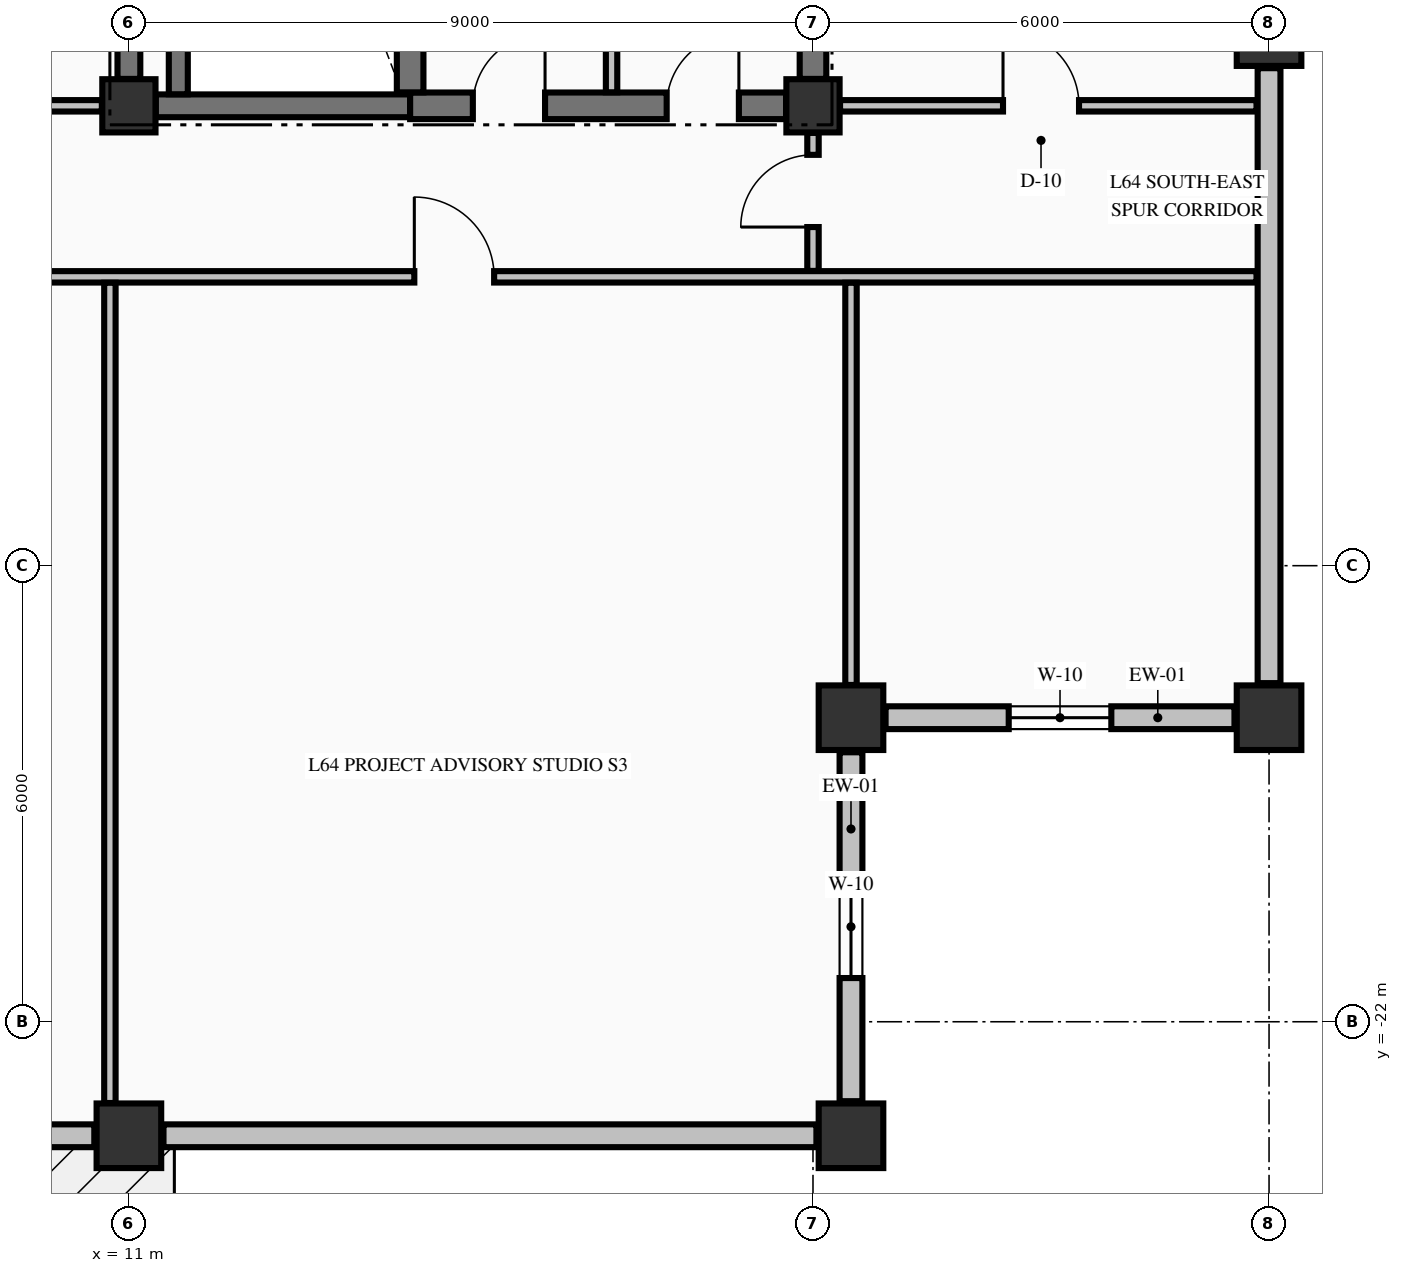
"""IFC4 building model, lengths in metres.
Left out: names, types, materials, properties, quantities, classifications, styles, units other than length and angle.
Written with IfcOpenShell. Run it as: python <this file> out.ifc"""

import sys

from ifc_helpers import new_model, si_unit, direction, frame, frame_2d, origin, origin_2d, place, context, subcontext, project, spatial, rectangle, extrude, element, fill, save


model = new_model("IFC4")
c1 = context("Model", 3, precision=1e-05, world=origin(), true_north=direction((0.0, 1.0)))
c2 = subcontext(c1, "Body", "Model", "MODEL_VIEW")
j1 = project(units=[si_unit("LENGTHUNIT", "METRE"), si_unit("PLANEANGLEUNIT", "RADIAN")], contexts=[c1])
p1 = place(None, origin())
s1 = spatial("IfcSite", under=j1, at=p1, CompositionType="ELEMENT")
p2 = place(p1, origin())
s2 = spatial("IfcBuilding", under=s1, at=p2, CompositionType="ELEMENT")
p3 = place(p2, frame((0.0, 0.0, 242.97)))
s3 = spatial("IfcBuildingStorey", under=s2, at=p3, CompositionType="ELEMENT", Elevation=242.97)
for number, where, z_axis, x_axis in (
    (1, (11.0, -23.5, -0.25), (0.0, 0.0, 1.0), (1.0, 0.0, 0.0)),
    (2, (20.5, -23.5, -0.25), (0.0, 0.0, 1.0), (1.0, 0.0, 0.0)),
    (3, (26.0, -18.0, -0.25), (0.0, 0.0, 1.0), (1.0, 0.0, 0.0)),
    (4, (26.0, -9.0, -0.25), (0.0, 0.0, 1.0), (1.0, 0.0, 0.0)),
    (5, (20.5, -18.0, -0.25), (0.0, 0.0, 1.0), (1.0, 0.0, 0.0)),
):
    element("IfcColumn", number, at=place(p3, frame(where, z_axis=z_axis, x_axis=x_axis)), inside=s3, PredefinedType="COLUMN", context=c2, shape_type="SweptSolid", body=[
        extrude(rectangle(XDim=0.85, YDim=0.85, at=origin_2d()), origin(), (0.0, 0.0, 1.0), 3.23),
    ])
for number, where, z_axis, x_axis in (
    (6, (11.0, -9.95, -0.25), (0.0, 0.0, 1.0), (1.0, 0.0, 0.0)),
    (7, (20.0, -9.95, -0.25), (0.0, 0.0, 1.0), (1.0, 0.0, 0.0)),
):
    element("IfcColumn", number, at=place(p3, frame(where, z_axis=z_axis, x_axis=x_axis)), inside=s3, PredefinedType="COLUMN", context=c2, shape_type="SweptSolid", body=[
        extrude(rectangle(XDim=0.7, YDim=0.7, at=origin_2d()), origin(), (0.0, 0.0, 1.0), 3.23),
    ])
p4 = place(p3, frame((20.5, -23.045, 0.0), z_axis=(0.0, 0.0, 1.0), x_axis=(0.0, 1.0, 0.0)))
e8 = element("IfcWall", 8, at=p4, inside=s3, PredefinedType="STANDARD", context=c2, shape_type="SweptSolid", body=[
    extrude(rectangle(XDim=4.59, YDim=0.3, at=frame_2d((2.295, 0.0))), origin(), (0.0, 0.0, 1.0), 2.372),
])
p5 = place(p4, frame((1.62, 0.0, 0.68)))
e9 = element("IfcOpeningElement", 9, at=p5, cuts=e8, PredefinedType="OPENING", context=c2, shape_type="SweptSolid", body=[
    extrude(rectangle(XDim=1.35, YDim=1.42, at=frame_2d((0.675, 0.71))), frame((0.0, 0.16, 0.0), z_axis=(0.0, -1.0, 0.0), x_axis=(1.0, 0.0, 0.0)), (0.0, 0.0, 1.0), 0.32),
])
p6 = place(p3, frame((20.955, -18.0, 0.0), z_axis=(0.0, 0.0, 1.0), x_axis=(1.0, 0.0, 0.0)))
e10 = element("IfcWall", 10, at=p6, inside=s3, PredefinedType="STANDARD", context=c2, shape_type="SweptSolid", body=[
    extrude(rectangle(XDim=4.59, YDim=0.3, at=frame_2d((2.295, 0.0))), origin(), (0.0, 0.0, 1.0), 2.372),
])
p7 = place(p6, frame((1.62, 0.0, 0.68)))
e11 = element("IfcOpeningElement", 11, at=p7, cuts=e10, PredefinedType="OPENING", context=c2, shape_type="SweptSolid", body=[
    extrude(rectangle(XDim=1.35, YDim=1.42, at=frame_2d((0.675, 0.71))), frame((0.0, 0.16, 0.0), z_axis=(0.0, -1.0, 0.0), x_axis=(1.0, 0.0, 0.0)), (0.0, 0.0, 1.0), 0.32),
])
p8 = place(p3, frame((0.455, -23.5, 0.0), z_axis=(0.0, 0.0, 1.0), x_axis=(1.0, 0.0, 0.0)))
e12 = element("IfcWall", 12, at=p8, inside=s3, PredefinedType="STANDARD", context=c2, shape_type="SweptSolid", body=[
    extrude(rectangle(XDim=10.09, YDim=0.3, at=frame_2d((5.045, 0.0))), origin(), (0.0, 0.0, 1.0), 2.372),
])
p9 = place(p8, frame((1.472, 0.0, 0.7)))
e13 = element("IfcOpeningElement", 13, at=p9, cuts=e12, PredefinedType="OPENING", context=c2, shape_type="SweptSolid", body=[
    extrude(rectangle(XDim=2.1, YDim=1.5, at=frame_2d((1.05, 0.75))), frame((0.0, 0.16, 0.0), z_axis=(0.0, -1.0, 0.0), x_axis=(1.0, 0.0, 0.0)), (0.0, 0.0, 1.0), 0.32),
])
p10 = place(p8, frame((3.995, 0.0, 0.7)))
e14 = element("IfcOpeningElement", 14, at=p10, cuts=e12, PredefinedType="OPENING", context=c2, shape_type="SweptSolid", body=[
    extrude(rectangle(XDim=2.1, YDim=1.5, at=frame_2d((1.05, 0.75))), frame((0.0, 0.16, 0.0), z_axis=(0.0, -1.0, 0.0), x_axis=(1.0, 0.0, 0.0)), (0.0, 0.0, 1.0), 0.32),
])
p11 = place(p8, frame((6.518, 0.0, 0.7)))
e15 = element("IfcOpeningElement", 15, at=p11, cuts=e12, PredefinedType="OPENING", context=c2, shape_type="SweptSolid", body=[
    extrude(rectangle(XDim=2.1, YDim=1.5, at=frame_2d((1.05, 0.75))), frame((0.0, 0.16, 0.0), z_axis=(0.0, -1.0, 0.0), x_axis=(1.0, 0.0, 0.0)), (0.0, 0.0, 1.0), 0.32),
])
p12 = place(p3, frame((11.455, -23.5, 0.0), z_axis=(0.0, 0.0, 1.0), x_axis=(1.0, 0.0, 0.0)))
e16 = element("IfcWall", 16, at=p12, inside=s3, PredefinedType="STANDARD", context=c2, shape_type="SweptSolid", body=[
    extrude(rectangle(XDim=8.59, YDim=0.3, at=frame_2d((4.295, 0.0))), origin(), (0.0, 0.0, 1.0), 2.372),
])
p13 = place(p3, frame((26.0, -17.545, 0.0), z_axis=(0.0, 0.0, 1.0), x_axis=(0.0, 1.0, 0.0)))
e17 = element("IfcWall", 17, at=p13, inside=s3, PredefinedType="STANDARD", context=c2, shape_type="SweptSolid", body=[
    extrude(rectangle(XDim=8.09, YDim=0.3, at=frame_2d((4.045, 0.0))), origin(), (0.0, 0.0, 1.0), 2.372),
])
p14 = place(p3, frame((11.354, -9.95, 0.0), z_axis=(0.0, 0.0, 1.0), x_axis=(1.0, 0.0, 0.0)))
e18 = element("IfcWall", 18, at=p14, inside=s3, PredefinedType="SHEAR", context=c2, shape_type="SweptSolid", body=[
    extrude(rectangle(XDim=3.346, YDim=0.3, at=frame_2d((1.673, 0.0))), origin(), (0.0, 0.0, 1.0), 2.98),
])
p15 = place(p3, frame((14.7, -9.95, 0.0), z_axis=(0.0, 0.0, 1.0), x_axis=(1.0, 0.0, 0.0)))
e19 = element("IfcWall", 19, at=p15, inside=s3, PredefinedType="SHEAR", context=c2, shape_type="SweptSolid", body=[
    extrude(rectangle(XDim=4.946, YDim=0.35, at=frame_2d((2.473, 0.0))), origin(), (0.0, 0.0, 1.0), 2.98),
])
p16 = place(p15, frame((0.825, 0.0, 0.0)))
e20 = element("IfcOpeningElement", 20, at=p16, cuts=e19, PredefinedType="OPENING", context=c2, shape_type="SweptSolid", body=[
    extrude(rectangle(XDim=0.95, YDim=2.15, at=frame_2d((0.475, 1.075))), frame((0.0, 0.185, 0.0), z_axis=(0.0, -1.0, 0.0), x_axis=(1.0, 0.0, 0.0)), (0.0, 0.0, 1.0), 0.37),
])
p17 = place(p15, frame((3.375, 0.0, 0.0)))
e21 = element("IfcOpeningElement", 21, at=p17, cuts=e19, PredefinedType="OPENING", context=c2, shape_type="SweptSolid", body=[
    extrude(rectangle(XDim=0.95, YDim=2.15, at=frame_2d((0.475, 1.075))), frame((0.0, 0.185, 0.0), z_axis=(0.0, -1.0, 0.0), x_axis=(1.0, 0.0, 0.0)), (0.0, 0.0, 1.0), 0.37),
])
p18 = place(p3, frame((-20.075, -12.2, 0.0), z_axis=(0.0, 0.0, 1.0), x_axis=(1.0, 0.0, 0.0)))
e22 = element("IfcWall", 22, at=p18, inside=s3, PredefinedType="PARTITIONING", context=c2, shape_type="SweptSolid", body=[
    extrude(rectangle(XDim=45.91, YDim=0.15, at=frame_2d((22.955, 0.0))), origin(), (0.0, 0.0, 1.0), 2.98),
])
p19 = place(p18, frame((11.88, 0.0, 0.0)))
e23 = element("IfcOpeningElement", 23, at=p19, cuts=e22, PredefinedType="OPENING", context=c2, shape_type="SweptSolid", body=[
    extrude(rectangle(XDim=1.05, YDim=2.15, at=frame_2d((0.525, 1.075))), frame((0.0, 0.085, 0.0), z_axis=(0.0, -1.0, 0.0), x_axis=(1.0, 0.0, 0.0)), (0.0, 0.0, 1.0), 0.17),
])
p20 = place(p18, frame((25.0, 0.0, 0.0)))
e24 = element("IfcOpeningElement", 24, at=p20, cuts=e22, PredefinedType="OPENING", context=c2, shape_type="SweptSolid", body=[
    extrude(rectangle(XDim=1.05, YDim=2.15, at=frame_2d((0.525, 1.075))), frame((0.0, 0.085, 0.0), z_axis=(0.0, -1.0, 0.0), x_axis=(1.0, 0.0, 0.0)), (0.0, 0.0, 1.0), 0.17),
])
p21 = place(p18, frame((34.83, 0.0, 0.0)))
e25 = element("IfcOpeningElement", 25, at=p21, cuts=e22, PredefinedType="OPENING", context=c2, shape_type="SweptSolid", body=[
    extrude(rectangle(XDim=1.05, YDim=2.15, at=frame_2d((0.525, 1.075))), frame((0.0, 0.085, 0.0), z_axis=(0.0, -1.0, 0.0), x_axis=(1.0, 0.0, 0.0)), (0.0, 0.0, 1.0), 0.17),
])
p22 = place(p3, frame((-10.644, -9.95, 0.0), z_axis=(0.0, 0.0, 1.0), x_axis=(1.0, 0.0, 0.0)))
e26 = element("IfcWall", 26, at=p22, inside=s3, PredefinedType="PARTITIONING", context=c2, shape_type="SweptSolid", body=[
    extrude(rectangle(XDim=21.288, YDim=0.15, at=frame_2d((10.644, 0.0))), origin(), (0.0, 0.0, 1.0), 2.98),
])
p23 = place(p22, frame((13.544, 0.0, 0.0)))
e27 = element("IfcOpeningElement", 27, at=p23, cuts=e26, PredefinedType="OPENING", context=c2, shape_type="SweptSolid", body=[
    extrude(rectangle(XDim=1.1, YDim=2.15, at=frame_2d((0.55, 1.075))), frame((0.0, 0.085, 0.0), z_axis=(0.0, -1.0, 0.0), x_axis=(1.0, 0.0, 0.0)), (0.0, 0.0, 1.0), 0.17),
])
p24 = place(p22, frame((19.349, 0.0, 0.0)))
e28 = element("IfcOpeningElement", 28, at=p24, cuts=e26, PredefinedType="OPENING", context=c2, shape_type="SweptSolid", body=[
    extrude(rectangle(XDim=0.95, YDim=2.15, at=frame_2d((0.475, 1.075))), frame((0.0, 0.085, 0.0), z_axis=(0.0, -1.0, 0.0), x_axis=(1.0, 0.0, 0.0)), (0.0, 0.0, 1.0), 0.17),
])
p25 = place(p3, frame((20.356, -9.95, 0.0), z_axis=(0.0, 0.0, 1.0), x_axis=(1.0, 0.0, 0.0)))
e29 = element("IfcWall", 29, at=p25, inside=s3, PredefinedType="PARTITIONING", context=c2, shape_type="SweptSolid", body=[
    extrude(rectangle(XDim=5.479, YDim=0.15, at=frame_2d((2.74, 0.0))), origin(), (0.0, 0.0, 1.0), 2.98),
])
p26 = place(p25, frame((2.144, 0.0, 0.0)))
e30 = element("IfcOpeningElement", 30, at=p26, cuts=e29, PredefinedType="OPENING", context=c2, shape_type="SweptSolid", body=[
    extrude(rectangle(XDim=1.0, YDim=2.15, at=frame_2d((0.5, 1.075))), frame((0.0, 0.085, 0.0), z_axis=(0.0, -1.0, 0.0), x_axis=(1.0, 0.0, 0.0)), (0.0, 0.0, 1.0), 0.17),
])
p27 = place(p3, frame((11.0, -9.596, 0.0), z_axis=(0.0, 0.0, 1.0), x_axis=(0.0, 1.0, 0.0)))
e31 = element("IfcWall", 31, at=p27, inside=s3, PredefinedType="SHEAR", context=c2, shape_type="SweptSolid", body=[
    extrude(rectangle(XDim=9.242, YDim=0.3, at=frame_2d((4.621, 0.0))), origin(), (0.0, 0.0, 1.0), 2.98),
])
p28 = place(p3, frame((11.65, -9.798, 0.0), z_axis=(0.0, 0.0, 1.0), x_axis=(0.0, 1.0, 0.0)))
e32 = element("IfcWall", 32, at=p28, inside=s3, PredefinedType="SOLIDWALL", context=c2, shape_type="SweptSolid", body=[
    extrude(rectangle(XDim=9.396, YDim=0.25, at=frame_2d((4.698, 0.0))), origin(), (0.0, 0.0, 1.0), 2.98),
])
p29 = place(p3, frame((14.7, -9.773, 0.0), z_axis=(0.0, 0.0, 1.0), x_axis=(0.0, 1.0, 0.0)))
e33 = element("IfcWall", 33, at=p29, inside=s3, PredefinedType="SHEAR", context=c2, shape_type="SweptSolid", body=[
    extrude(rectangle(XDim=9.371, YDim=0.35, at=frame_2d((4.686, 0.0))), origin(), (0.0, 0.0, 1.0), 2.98),
])
p30 = place(p3, frame((20.0, -9.596, 0.0), z_axis=(0.0, 0.0, 1.0), x_axis=(0.0, 1.0, 0.0)))
e34 = element("IfcWall", 34, at=p30, inside=s3, PredefinedType="SHEAR", context=c2, shape_type="SweptSolid", body=[
    extrude(rectangle(XDim=9.242, YDim=0.35, at=frame_2d((4.621, 0.0))), origin(), (0.0, 0.0, 1.0), 2.98),
])
p31 = place(p3, frame((10.75, -23.069, 0.0), z_axis=(0.0, 0.0, 1.0), x_axis=(0.0, 1.0, 0.0)))
e35 = element("IfcWall", 35, at=p31, inside=s3, PredefinedType="PARTITIONING", context=c2, shape_type="SweptSolid", body=[
    extrude(rectangle(XDim=10.791, YDim=0.15, at=frame_2d((5.396, 0.0))), origin(), (0.0, 0.0, 1.0), 2.57),
])
p32 = place(p3, frame((17.35, -9.772, 0.0), z_axis=(0.0, 0.0, 1.0), x_axis=(0.0, 1.0, 0.0)))
e36 = element("IfcWall", 36, at=p32, inside=s3, PredefinedType="PARTITIONING", context=c2, shape_type="SweptSolid", body=[
    extrude(rectangle(XDim=7.194, YDim=0.15, at=frame_2d((3.597, 0.0))), origin(), (0.0, 0.0, 1.0), 2.98),
])
p33 = place(p3, frame((20.0, -12.122, 0.0), z_axis=(0.0, 0.0, 1.0), x_axis=(0.0, 1.0, 0.0)))
e37 = element("IfcWall", 37, at=p33, inside=s3, PredefinedType="PARTITIONING", context=c2, shape_type="SweptSolid", body=[
    extrude(rectangle(XDim=1.816, YDim=0.15, at=frame_2d((0.908, 0.0))), origin(), (0.0, 0.0, 1.0), 2.98),
])
p34 = place(p33, frame((0.577, 0.0, 0.0)))
e38 = element("IfcOpeningElement", 38, at=p34, cuts=e37, PredefinedType="OPENING", context=c2, shape_type="SweptSolid", body=[
    extrude(rectangle(XDim=0.95, YDim=2.15, at=frame_2d((0.475, 1.075))), frame((0.0, 0.085, 0.0), z_axis=(0.0, -1.0, 0.0), x_axis=(1.0, 0.0, 0.0)), (0.0, 0.0, 1.0), 0.17),
])
p35 = place(p3, frame((20.5, -17.569, 0.0), z_axis=(0.0, 0.0, 1.0), x_axis=(0.0, 1.0, 0.0)))
e39 = element("IfcWall", 39, at=p35, inside=s3, PredefinedType="PARTITIONING", context=c2, shape_type="SweptSolid", body=[
    extrude(rectangle(XDim=5.291, YDim=0.15, at=frame_2d((2.646, 0.0))), origin(), (0.0, 0.0, 1.0), 2.98),
])
p36 = place(p5, origin())
e40 = element("IfcWindow", 40, at=p36, inside=s3, PartitioningType="SINGLE_PANEL", PredefinedType="WINDOW", context=c2, shape_type="SweptSolid", body=[
    extrude(rectangle(XDim=1.35, YDim=1.42, at=frame_2d((0.675, 0.71))), frame((0.0, 0.03, 0.0), z_axis=(0.0, -1.0, 0.0), x_axis=(1.0, 0.0, 0.0)), (0.0, 0.0, 1.0), 0.06),
])
fill(e9, e40)
p37 = place(p7, origin())
e41 = element("IfcWindow", 41, at=p37, inside=s3, PartitioningType="SINGLE_PANEL", PredefinedType="WINDOW", context=c2, shape_type="SweptSolid", body=[
    extrude(rectangle(XDim=1.35, YDim=1.42, at=frame_2d((0.675, 0.71))), frame((0.0, 0.03, 0.0), z_axis=(0.0, -1.0, 0.0), x_axis=(1.0, 0.0, 0.0)), (0.0, 0.0, 1.0), 0.06),
])
fill(e11, e41)
p38 = place(p16, origin())
e42 = element("IfcDoor", 42, at=p38, inside=s3, OperationType="SINGLE_SWING_RIGHT", PredefinedType="DOOR", context=c2, shape_type="SweptSolid", body=[
    extrude(rectangle(XDim=0.95, YDim=2.15, at=frame_2d((0.475, 1.075))), frame((0.0, 0.025, 0.0), z_axis=(0.0, -1.0, 0.0), x_axis=(1.0, 0.0, 0.0)), (0.0, 0.0, 1.0), 0.05),
])
fill(e20, e42)
p39 = place(p17, origin())
e43 = element("IfcDoor", 43, at=p39, inside=s3, OperationType="SINGLE_SWING_RIGHT", PredefinedType="DOOR", context=c2, shape_type="SweptSolid", body=[
    extrude(rectangle(XDim=0.95, YDim=2.15, at=frame_2d((0.475, 1.075))), frame((0.0, 0.025, 0.0), z_axis=(0.0, -1.0, 0.0), x_axis=(1.0, 0.0, 0.0)), (0.0, 0.0, 1.0), 0.05),
])
fill(e21, e43)
p40 = place(p21, origin())
e44 = element("IfcDoor", 44, at=p40, inside=s3, OperationType="SINGLE_SWING_LEFT", PredefinedType="DOOR", context=c2, shape_type="SweptSolid", body=[
    extrude(rectangle(XDim=1.05, YDim=2.15, at=frame_2d((0.525, 1.075))), frame((0.0, 0.025, 0.0), z_axis=(0.0, -1.0, 0.0), x_axis=(1.0, 0.0, 0.0)), (0.0, 0.0, 1.0), 0.05),
])
fill(e25, e44)
p41 = place(p34, origin())
e45 = element("IfcDoor", 45, at=p41, inside=s3, OperationType="SINGLE_SWING_LEFT", PredefinedType="DOOR", context=c2, shape_type="SweptSolid", body=[
    extrude(rectangle(XDim=0.95, YDim=2.15, at=frame_2d((0.475, 1.075))), frame((0.0, 0.025, 0.0), z_axis=(0.0, -1.0, 0.0), x_axis=(1.0, 0.0, 0.0)), (0.0, 0.0, 1.0), 0.05),
])
fill(e38, e45)
p42 = place(p26, origin())
e46 = element("IfcDoor", 46, at=p42, inside=s3, OperationType="SINGLE_SWING_LEFT", PredefinedType="DOOR", context=c2, shape_type="SweptSolid", body=[
    extrude(rectangle(XDim=1.0, YDim=2.15, at=frame_2d((0.5, 1.075))), frame((0.0, 0.025, 0.0), z_axis=(0.0, -1.0, 0.0), x_axis=(1.0, 0.0, 0.0)), (0.0, 0.0, 1.0), 0.05),
])
fill(e30, e46)
save(model, sys.argv[1])
